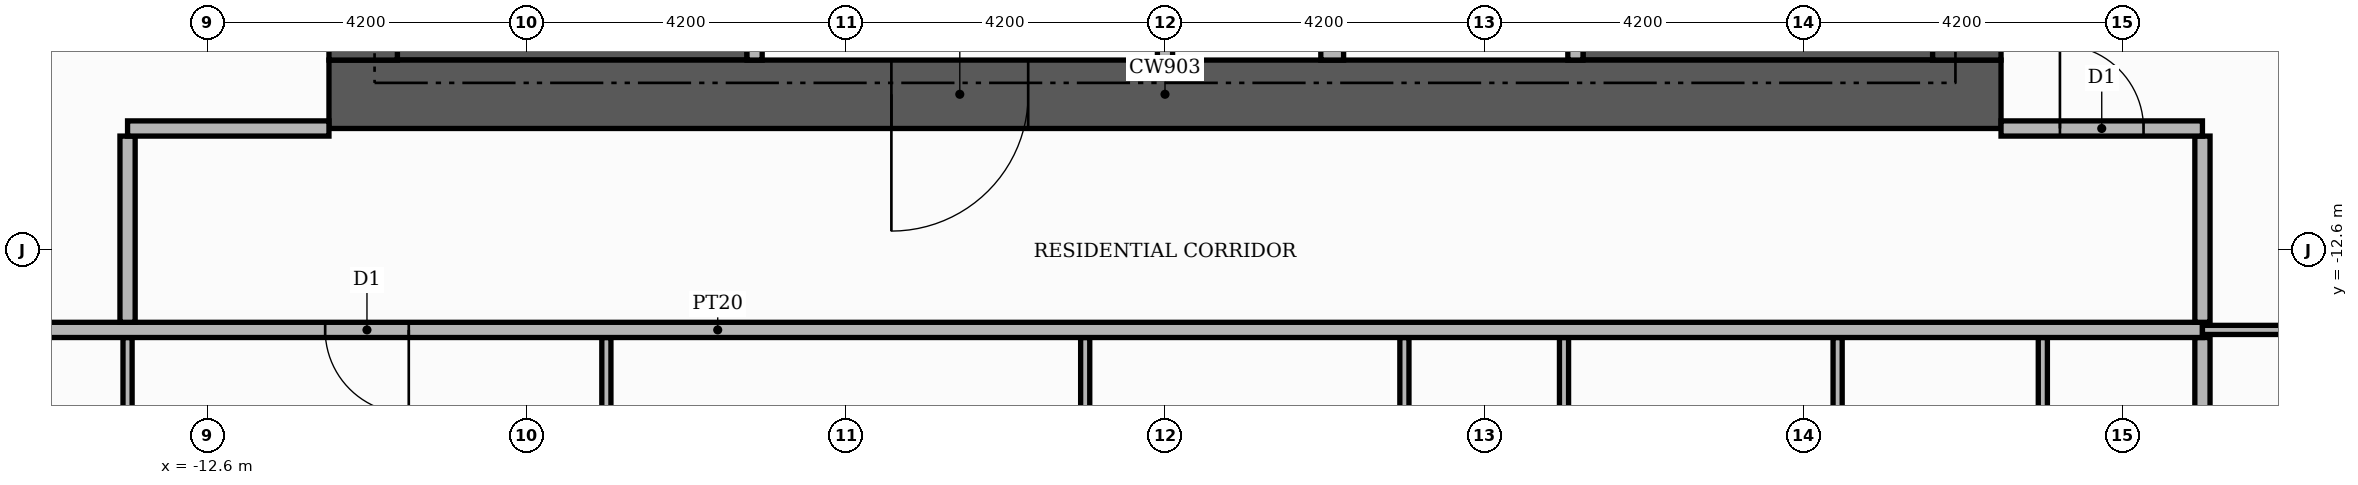
"""IFC4 building model, lengths in metres.
Left out: names, types, materials, properties, quantities, classifications, styles, units other than length and angle.
Written with IfcOpenShell. Run it as: python <this file> out.ifc"""

import sys

from ifc_helpers import new_model, si_unit, direction, frame, frame_2d, origin, place, context, subcontext, project, spatial, rectangle, extrude, element, fill, save


model = new_model("IFC4")
c1 = context("Model", 3, precision=1e-05, world=origin(), true_north=direction((0.0, 1.0)))
c2 = subcontext(c1, "Body", "Model", "MODEL_VIEW")
j1 = project(units=[si_unit("LENGTHUNIT", "METRE"), si_unit("PLANEANGLEUNIT", "RADIAN")], contexts=[c1])
p1 = place(None, origin())
s1 = spatial("IfcSite", under=j1, at=p1, CompositionType="ELEMENT")
p2 = place(p1, origin())
s2 = spatial("IfcBuilding", under=s1, at=p2, CompositionType="ELEMENT")
p3 = place(p2, frame((0.0, 0.0, 145.5)))
s3 = spatial("IfcBuildingStorey", under=s2, at=p3, CompositionType="ELEMENT", Elevation=145.5)
for number, where, z_axis, x_axis in (
    (1, (-10.1, -9.15, 0.0), (0.0, 0.0, 1.0), (1.0, 0.0, 0.0)),
    (2, (5.5, -9.15, 0.0), (0.0, 0.0, 1.0), (1.0, 0.0, 0.0)),
):
    element("IfcWall", number, at=place(p3, frame(where, z_axis=z_axis, x_axis=x_axis)), inside=s3, PredefinedType="SHEAR", context=c2, shape_type="SweptSolid", body=[
        extrude(rectangle(XDim=4.6, YDim=1.9, at=frame_2d((2.3, 0.0))), origin(), (0.0, 0.0, 1.0), 3.48),
    ])
p4 = place(p3, frame((-11.0, -10.55, 0.0), z_axis=(0.0, 0.0, 1.0), x_axis=(1.0, 0.0, 0.0)))
e3 = element("IfcWall", 3, at=p4, inside=s3, PredefinedType="SHEAR", context=c2, shape_type="SweptSolid", body=[
    extrude(rectangle(XDim=22.0, YDim=0.9, at=frame_2d((11.0, 0.0))), origin(), (0.0, 0.0, 1.0), 3.48),
])
p5 = place(p4, frame((7.4, 0.0, 0.0)))
e4 = element("IfcOpeningElement", 4, at=p5, cuts=e3, PredefinedType="OPENING", context=c2, shape_type="SweptSolid", body=[
    extrude(rectangle(XDim=1.8, YDim=2.2, at=frame_2d((0.9, 1.1))), frame((0.0, 0.46, 0.0), z_axis=(0.0, -1.0, 0.0), x_axis=(1.0, 0.0, 0.0)), (0.0, 0.0, 1.0), 0.92),
])
for number, where, z_axis, x_axis in (
    (5, (-10.55, -10.1, 0.0), (0.0, 0.0, 1.0), (0.0, 1.0, 0.0)),
    (6, (10.55, -10.1, 0.0), (0.0, 0.0, 1.0), (0.0, 1.0, 0.0)),
):
    element("IfcWall", number, at=place(p3, frame(where, z_axis=z_axis, x_axis=x_axis)), inside=s3, PredefinedType="SHEAR", context=c2, shape_type="SweptSolid", body=[
        extrude(rectangle(XDim=20.2, YDim=0.9, at=frame_2d((10.1, 0.0))), origin(), (0.0, 0.0, 1.0), 3.48),
    ])
p6 = place(p3, frame((-5.4, -10.1, 0.0), z_axis=(0.0, 0.0, 1.0), x_axis=(0.0, 1.0, 0.0)))
e7 = element("IfcWall", 7, at=p6, inside=s3, PredefinedType="PARTITIONING", context=c2, shape_type="SweptSolid", body=[
    extrude(rectangle(XDim=4.6, YDim=0.2, at=frame_2d((2.3, 0.0))), origin(), (0.0, 0.0, 1.0), 3.48),
])
p7 = place(p6, frame((2.9, 0.0, 0.0)))
e8 = element("IfcOpeningElement", 8, at=p7, cuts=e7, PredefinedType="OPENING", context=c2, shape_type="SweptSolid", body=[
    extrude(rectangle(XDim=1.0, YDim=2.1, at=frame_2d((0.5, 1.05))), frame((0.0, 0.11, 0.0), z_axis=(0.0, -1.0, 0.0), x_axis=(1.0, 0.0, 0.0)), (0.0, 0.0, 1.0), 0.22),
])
p8 = place(p3, frame((0.0, -10.1, 0.0), z_axis=(0.0, 0.0, 1.0), x_axis=(0.0, 1.0, 0.0)))
e9 = element("IfcWall", 9, at=p8, inside=s3, PredefinedType="PARTITIONING", context=c2, shape_type="SweptSolid", body=[
    extrude(rectangle(XDim=2.2, YDim=0.2, at=frame_2d((1.1, 0.0))), origin(), (0.0, 0.0, 1.0), 3.48),
])
p9 = place(p3, frame((2.2, -10.1, 0.0), z_axis=(0.0, 0.0, 1.0), x_axis=(0.0, 1.0, 0.0)))
e10 = element("IfcWall", 10, at=p9, inside=s3, PredefinedType="PARTITIONING", context=c2, shape_type="SweptSolid", body=[
    extrude(rectangle(XDim=2.2, YDim=0.3, at=frame_2d((1.1, 0.0))), origin(), (0.0, 0.0, 1.0), 3.48),
])
p10 = place(p3, frame((5.4, -10.1, 0.0), z_axis=(0.0, 0.0, 1.0), x_axis=(0.0, 1.0, 0.0)))
e11 = element("IfcWall", 11, at=p10, inside=s3, PredefinedType="PARTITIONING", context=c2, shape_type="SweptSolid", body=[
    extrude(rectangle(XDim=4.6, YDim=0.2, at=frame_2d((2.3, 0.0))), origin(), (0.0, 0.0, 1.0), 3.48),
])
p11 = place(p10, frame((2.9, 0.0, 0.0)))
e12 = element("IfcOpeningElement", 12, at=p11, cuts=e11, PredefinedType="OPENING", context=c2, shape_type="SweptSolid", body=[
    extrude(rectangle(XDim=1.0, YDim=2.1, at=frame_2d((0.5, 1.05))), frame((0.0, 0.11, 0.0), z_axis=(0.0, -1.0, 0.0), x_axis=(1.0, 0.0, 0.0)), (0.0, 0.0, 1.0), 0.22),
])
p12 = place(p3, frame((13.65, -25.42, 0.0), z_axis=(0.0, 0.0, 1.0), x_axis=(0.0, 1.0, 0.0)))
e13 = element("IfcWall", 13, at=p12, inside=s3, PredefinedType="PARTITIONING", context=c2, shape_type="SweptSolid", body=[
    extrude(rectangle(XDim=11.67, YDim=0.2, at=frame_2d((5.835, 0.0))), origin(), (0.0, 0.0, 1.0), 3.48),
])
p13 = place(p3, frame((-13.65, -20.66, 0.0), z_axis=(0.0, 0.0, 1.0), x_axis=(0.0, 1.0, 0.0)))
e14 = element("IfcWall", 14, at=p13, inside=s3, PredefinedType="PARTITIONING", context=c2, shape_type="SweptSolid", body=[
    extrude(rectangle(XDim=6.91, YDim=0.12, at=frame_2d((3.455, 0.0))), origin(), (0.0, 0.0, 1.0), 3.48),
])
p14 = place(p13, frame((3.025, 0.0, 0.0)))
e15 = element("IfcOpeningElement", 15, at=p14, cuts=e14, PredefinedType="OPENING", context=c2, shape_type="SweptSolid", body=[
    extrude(rectangle(XDim=0.9, YDim=2.1, at=frame_2d((0.45, 1.05))), frame((0.0, 0.07, 0.0), z_axis=(0.0, -1.0, 0.0), x_axis=(1.0, 0.0, 0.0)), (0.0, 0.0, 1.0), 0.14),
])
for number, where, z_axis, x_axis in (
    (16, (-7.35, -19.16, 0.0), (0.0, 0.0, 1.0), (0.0, 1.0, 0.0)),
    (17, (-1.05, -19.16, 0.0), (0.0, 0.0, 1.0), (0.0, 1.0, 0.0)),
    (18, (3.15, -19.16, 0.0), (0.0, 0.0, 1.0), (0.0, 1.0, 0.0)),
    (19, (5.25, -19.16, 0.0), (0.0, 0.0, 1.0), (0.0, 1.0, 0.0)),
    (20, (8.85, -19.16, 0.0), (0.0, 0.0, 1.0), (0.0, 1.0, 0.0)),
    (21, (11.55, -19.16, 0.0), (0.0, 0.0, 1.0), (0.0, 1.0, 0.0)),
):
    element("IfcWall", number, at=place(p3, frame(where, z_axis=z_axis, x_axis=x_axis)), inside=s3, PredefinedType="PARTITIONING", context=c2, shape_type="SweptSolid", body=[
        extrude(rectangle(XDim=5.41, YDim=0.12, at=frame_2d((2.705, 0.0))), origin(), (0.0, 0.0, 1.0), 3.48),
    ])
p15 = place(p3, frame((-25.42, -13.65, 0.0), z_axis=(0.0, 0.0, 1.0), x_axis=(1.0, 0.0, 0.0)))
e22 = element("IfcWall", 22, at=p15, inside=s3, PredefinedType="PARTITIONING", context=c2, shape_type="SweptSolid", body=[
    extrude(rectangle(XDim=39.07, YDim=0.2, at=frame_2d((19.535, 0.0))), origin(), (0.0, 0.0, 1.0), 3.48),
])
p16 = place(p15, frame((14.37, 0.0, 0.0)))
e23 = element("IfcOpeningElement", 23, at=p16, cuts=e22, PredefinedType="OPENING", context=c2, shape_type="SweptSolid", body=[
    extrude(rectangle(XDim=1.1, YDim=2.4, at=frame_2d((0.55, 1.2))), frame((0.0, 0.11, 0.0), z_axis=(0.0, -1.0, 0.0), x_axis=(1.0, 0.0, 0.0)), (0.0, 0.0, 1.0), 0.22),
])
p17 = place(p3, frame((13.65, -13.65, 0.0), z_axis=(0.0, 0.0, 1.0), x_axis=(1.0, 0.0, 0.0)))
e24 = element("IfcWall", 24, at=p17, inside=s3, PredefinedType="PARTITIONING", context=c2, shape_type="SweptSolid", body=[
    extrude(rectangle(XDim=6.77, YDim=0.12, at=frame_2d((3.385, 0.0))), origin(), (0.0, 0.0, 1.0), 3.48),
])
p18 = place(p17, frame((2.935, 0.0, 0.0)))
e25 = element("IfcOpeningElement", 25, at=p18, cuts=e24, PredefinedType="OPENING", context=c2, shape_type="SweptSolid", body=[
    extrude(rectangle(XDim=0.9, YDim=2.1, at=frame_2d((0.45, 1.05))), frame((0.0, 0.07, 0.0), z_axis=(0.0, -1.0, 0.0), x_axis=(1.0, 0.0, 0.0)), (0.0, 0.0, 1.0), 0.14),
])
for number, where, z_axis, x_axis in (
    (26, (-13.65, -13.55, 0.0), (0.0, 0.0, 1.0), (0.0, 1.0, 0.0)),
    (27, (13.65, -13.55, 0.0), (0.0, 0.0, 1.0), (0.0, 1.0, 0.0)),
):
    element("IfcWall", number, at=place(p3, frame(where, z_axis=z_axis, x_axis=x_axis)), inside=s3, PredefinedType="PARTITIONING", context=c2, shape_type="SweptSolid", body=[
        extrude(rectangle(XDim=2.45, YDim=0.2, at=frame_2d((1.225, 0.0))), origin(), (0.0, 0.0, 1.0), 3.48),
    ])
p19 = place(p3, frame((-13.65, -11.0, 0.0), z_axis=(0.0, 0.0, 1.0), x_axis=(1.0, 0.0, 0.0)))
e28 = element("IfcWall", 28, at=p19, inside=s3, PredefinedType="PARTITIONING", context=c2, shape_type="SweptSolid", body=[
    extrude(rectangle(XDim=2.65, YDim=0.2, at=frame_2d((1.325, 0.0))), origin(), (0.0, 0.0, 1.0), 3.48),
])
p20 = place(p3, frame((11.0, -11.0, 0.0), z_axis=(0.0, 0.0, 1.0), x_axis=(1.0, 0.0, 0.0)))
e29 = element("IfcWall", 29, at=p20, inside=s3, PredefinedType="PARTITIONING", context=c2, shape_type="SweptSolid", body=[
    extrude(rectangle(XDim=2.65, YDim=0.2, at=frame_2d((1.325, 0.0))), origin(), (0.0, 0.0, 1.0), 3.48),
])
p21 = place(p20, frame((0.775, 0.0, 0.0)))
e30 = element("IfcOpeningElement", 30, at=p21, cuts=e29, PredefinedType="OPENING", context=c2, shape_type="SweptSolid", body=[
    extrude(rectangle(XDim=1.1, YDim=2.4, at=frame_2d((0.55, 1.2))), frame((0.0, 0.11, 0.0), z_axis=(0.0, -1.0, 0.0), x_axis=(1.0, 0.0, 0.0)), (0.0, 0.0, 1.0), 0.22),
])
p22 = place(p5, frame((1.8, 0.0, 0.0), z_axis=(0.0, 0.0, 1.0), x_axis=(-1.0, 0.0, 0.0)))
e31 = element("IfcDoor", 31, at=p22, inside=s3, OperationType="DOUBLE_DOOR_SINGLE_SWING", PredefinedType="DOOR", context=c2, shape_type="SweptSolid", body=[
    extrude(rectangle(XDim=1.8, YDim=2.2, at=frame_2d((0.9, 1.1))), frame((0.0, 0.025, 0.0), z_axis=(0.0, -1.0, 0.0), x_axis=(1.0, 0.0, 0.0)), (0.0, 0.0, 1.0), 0.05),
])
fill(e4, e31)
p23 = place(p16, frame((1.1, 0.0, 0.0), z_axis=(0.0, 0.0, 1.0), x_axis=(-1.0, 0.0, 0.0)))
e32 = element("IfcDoor", 32, at=p23, inside=s3, OperationType="SINGLE_SWING_RIGHT", PredefinedType="DOOR", context=c2, shape_type="SweptSolid", body=[
    extrude(rectangle(XDim=1.1, YDim=2.4, at=frame_2d((0.55, 1.2))), frame((0.0, 0.025, 0.0), z_axis=(0.0, -1.0, 0.0), x_axis=(1.0, 0.0, 0.0)), (0.0, 0.0, 1.0), 0.05),
])
fill(e23, e32)
p24 = place(p21, origin())
e33 = element("IfcDoor", 33, at=p24, inside=s3, OperationType="SINGLE_SWING_LEFT", PredefinedType="DOOR", context=c2, shape_type="SweptSolid", body=[
    extrude(rectangle(XDim=1.1, YDim=2.4, at=frame_2d((0.55, 1.2))), frame((0.0, 0.025, 0.0), z_axis=(0.0, -1.0, 0.0), x_axis=(1.0, 0.0, 0.0)), (0.0, 0.0, 1.0), 0.05),
])
fill(e30, e33)
save(model, sys.argv[1])
